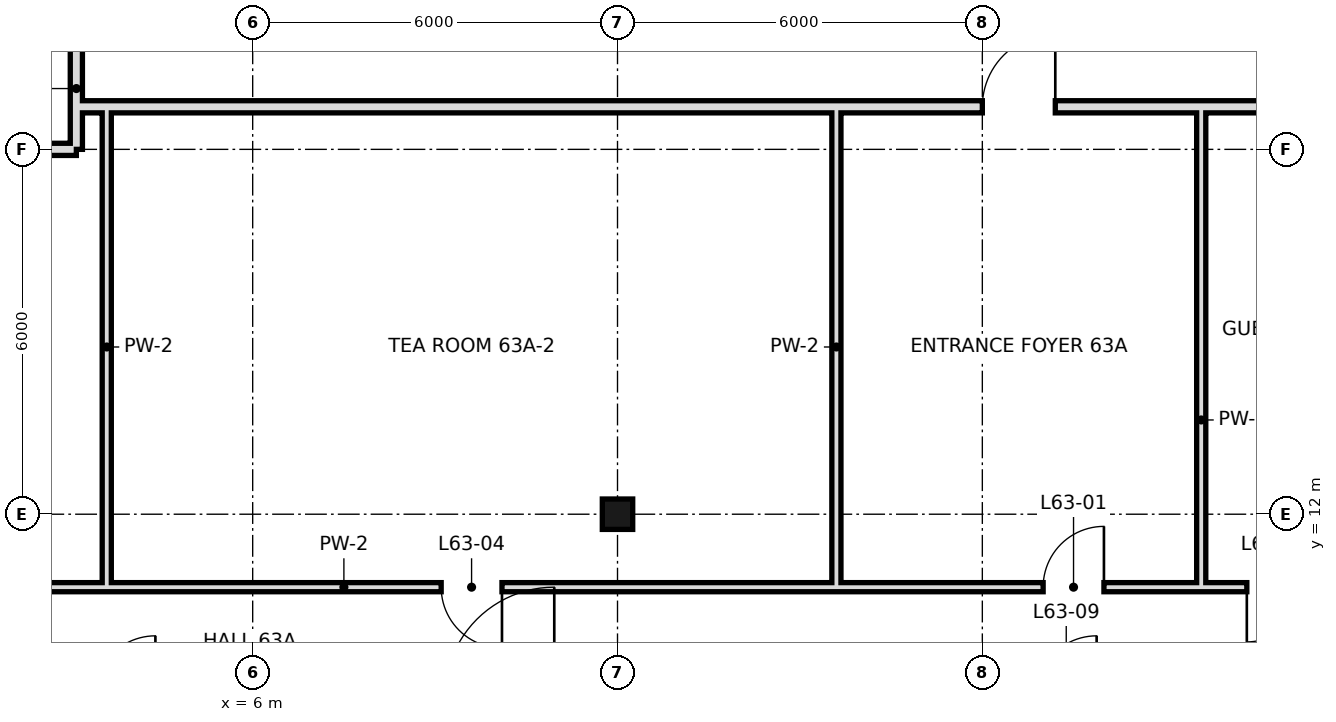
"""IFC4 building model, lengths in metres.
Left out: names, types, materials, properties, quantities, classifications, styles, units other than length and angle.
Written with IfcOpenShell. Run it as: python <this file> out.ifc"""

import sys

from ifc_helpers import new_model, si_unit, direction, frame, frame_2d, origin, origin_2d, place, context, subcontext, project, spatial, rectangle, hollow_rectangle, extrude, element, fill, save


model = new_model("IFC4")
c1 = context("Model", 3, precision=1e-05, world=origin(), true_north=direction((0.0, 1.0)))
c2 = subcontext(c1, "Body", "Model", "MODEL_VIEW")
j1 = project(units=[si_unit("LENGTHUNIT", "METRE"), si_unit("PLANEANGLEUNIT", "RADIAN")], contexts=[c1])
p1 = place(None, origin())
s1 = spatial("IfcSite", under=j1, at=p1, CompositionType="ELEMENT")
p2 = place(p1, origin())
s2 = spatial("IfcBuilding", under=s1, at=p2, CompositionType="ELEMENT")
p3 = place(p2, frame((0.0, 0.0, 266.6)))
s3 = spatial("IfcBuildingStorey", under=s2, at=p3, CompositionType="ELEMENT", Elevation=266.6)
p4 = place(p3, frame((12.0, 12.0, 0.0), z_axis=(0.0, 0.0, 1.0), x_axis=(1.0, 0.0, 0.0)))
e1 = element("IfcColumn", 1, at=p4, inside=s3, PredefinedType="COLUMN", context=c2, shape_type="SweptSolid", body=[
    extrude(hollow_rectangle(XDim=0.5, YDim=0.5, WallThickness=0.025, at=origin_2d()), origin(), (0.0, 0.0, 1.0), 3.6),
])
for number, where, z_axis, x_axis in (
    (2, (15.6, 10.8, 0.0), (0.0, 0.0, 1.0), (0.0, 1.0, 0.0)),
    (3, (21.6, 10.8, 0.0), (0.0, 0.0, 1.0), (0.0, 1.0, 0.0)),
):
    element("IfcWall", number, at=place(p3, frame(where, z_axis=z_axis, x_axis=x_axis)), inside=s3, PredefinedType="PARTITIONING", context=c2, shape_type="SweptSolid", body=[
        extrude(rectangle(XDim=7.9, YDim=0.15, at=frame_2d((3.95, 0.0))), origin(), (0.0, 0.0, 1.0), 3.42),
    ])
p5 = place(p3, frame((3.1, 18.7, 0.0), z_axis=(0.0, 0.0, 1.0), x_axis=(0.0, 1.0, 0.0)))
e4 = element("IfcWall", 4, at=p5, inside=s3, PredefinedType="SOLIDWALL", context=c2, shape_type="SweptSolid", body=[
    extrude(rectangle(XDim=21.5, YDim=0.2, at=frame_2d((10.75, 0.0))), origin(), (0.0, 0.0, 1.0), 2.97),
])
p6 = place(p5, frame((6.5, 0.0, 0.0)))
e5 = element("IfcOpeningElement", 5, at=p6, cuts=e4, PredefinedType="OPENING", context=c2, shape_type="SweptSolid", body=[
    extrude(rectangle(XDim=1.2, YDim=2.4, at=frame_2d((0.6, 1.2))), frame((0.0, 0.11, 0.0), z_axis=(0.0, -1.0, 0.0), x_axis=(1.0, 0.0, 0.0)), (0.0, 0.0, 1.0), 0.22),
])
p7 = place(p3, frame((3.1, 18.0, 0.0), z_axis=(0.0, 0.0, 1.0), x_axis=(0.0, 1.0, 0.0)))
e6 = element("IfcWall", 6, at=p7, inside=s3, PredefinedType="SOLIDWALL", context=c2, shape_type="SweptSolid", body=[
    extrude(rectangle(XDim=0.7, YDim=0.2, at=frame_2d((0.35, 0.0))), origin(), (0.0, 0.0, 1.0), 2.97),
])
p8 = place(p3, frame((3.6, 10.8, 0.0), z_axis=(0.0, 0.0, 1.0), x_axis=(0.0, 1.0, 0.0)))
e7 = element("IfcWall", 7, at=p8, inside=s3, PredefinedType="PARTITIONING", context=c2, shape_type="SweptSolid", body=[
    extrude(rectangle(XDim=7.9, YDim=0.15, at=frame_2d((3.95, 0.0))), origin(), (0.0, 0.0, 1.0), 3.42),
])
p9 = place(p3, frame((-6.6, 10.8, 0.0), z_axis=(0.0, 0.0, 1.0), x_axis=(1.0, 0.0, 0.0)))
e8 = element("IfcWall", 8, at=p9, inside=s3, PredefinedType="PARTITIONING", context=c2, shape_type="SweptSolid", body=[
    extrude(rectangle(XDim=28.2, YDim=0.15, at=frame_2d((14.1, 0.0))), origin(), (0.0, 0.0, 1.0), 3.42),
])
p10 = place(p9, frame((25.6, 0.0, 0.0)))
e9 = element("IfcOpeningElement", 9, at=p10, cuts=e8, PredefinedType="OPENING", context=c2, shape_type="SweptSolid", body=[
    extrude(rectangle(XDim=1.0, YDim=2.4, at=frame_2d((0.5, 1.2))), frame((0.0, 0.085, 0.0), z_axis=(0.0, -1.0, 0.0), x_axis=(1.0, 0.0, 0.0)), (0.0, 0.0, 1.0), 0.17),
])
p11 = place(p9, frame((4.6, 0.0, 0.0)))
e10 = element("IfcOpeningElement", 10, at=p11, cuts=e8, PredefinedType="OPENING", context=c2, shape_type="SweptSolid", body=[
    extrude(rectangle(XDim=1.0, YDim=2.4, at=frame_2d((0.5, 1.2))), frame((0.0, 0.085, 0.0), z_axis=(0.0, -1.0, 0.0), x_axis=(1.0, 0.0, 0.0)), (0.0, 0.0, 1.0), 0.17),
])
p12 = place(p9, frame((15.7, 0.0, 0.0)))
e11 = element("IfcOpeningElement", 11, at=p12, cuts=e8, PredefinedType="OPENING", context=c2, shape_type="SweptSolid", body=[
    extrude(rectangle(XDim=1.0, YDim=2.4, at=frame_2d((0.5, 1.2))), frame((0.0, 0.085, 0.0), z_axis=(0.0, -1.0, 0.0), x_axis=(1.0, 0.0, 0.0)), (0.0, 0.0, 1.0), 0.17),
])
p13 = place(p3, frame((21.6, 10.8, 0.0), z_axis=(0.0, 0.0, 1.0), x_axis=(1.0, 0.0, 0.0)))
e12 = element("IfcWall", 12, at=p13, inside=s3, PredefinedType="PARTITIONING", context=c2, shape_type="SweptSolid", body=[
    extrude(rectangle(XDim=2.4, YDim=0.15, at=frame_2d((1.2, 0.0))), origin(), (0.0, 0.0, 1.0), 3.42),
])
p14 = place(p13, frame((0.75, 0.0, 0.0)))
e13 = element("IfcOpeningElement", 13, at=p14, cuts=e12, PredefinedType="OPENING", context=c2, shape_type="SweptSolid", body=[
    extrude(rectangle(XDim=0.9, YDim=2.4, at=frame_2d((0.45, 1.2))), frame((0.0, 0.085, 0.0), z_axis=(0.0, -1.0, 0.0), x_axis=(1.0, 0.0, 0.0)), (0.0, 0.0, 1.0), 0.17),
])
p15 = place(p3, frame((-6.6, 18.0, 0.0), z_axis=(0.0, 0.0, 1.0), x_axis=(1.0, 0.0, 0.0)))
e14 = element("IfcWall", 14, at=p15, inside=s3, PredefinedType="SOLIDWALL", context=c2, shape_type="SweptSolid", body=[
    extrude(rectangle(XDim=9.7, YDim=0.2, at=frame_2d((4.85, 0.0))), origin(), (0.0, 0.0, 1.0), 2.72),
])
p16 = place(p3, frame((3.1, 18.7, 0.0), z_axis=(0.0, 0.0, 1.0), x_axis=(1.0, 0.0, 0.0)))
e15 = element("IfcWall", 15, at=p16, inside=s3, PredefinedType="SOLIDWALL", context=c2, shape_type="SweptSolid", body=[
    extrude(rectangle(XDim=20.9, YDim=0.2, at=frame_2d((10.45, 0.0))), origin(), (0.0, 0.0, 1.0), 2.72),
])
p17 = place(p16, frame((14.9, 0.0, 0.0)))
e16 = element("IfcOpeningElement", 16, at=p17, cuts=e15, PredefinedType="OPENING", context=c2, shape_type="SweptSolid", body=[
    extrude(rectangle(XDim=1.2, YDim=2.4, at=frame_2d((0.6, 1.2))), frame((0.0, 0.11, 0.0), z_axis=(0.0, -1.0, 0.0), x_axis=(1.0, 0.0, 0.0)), (0.0, 0.0, 1.0), 0.22),
])
p18 = place(p10, frame((1.0, 0.0, 0.0), z_axis=(0.0, 0.0, 1.0), x_axis=(-1.0, 0.0, 0.0)))
e17 = element("IfcDoor", 17, at=p18, inside=s3, OperationType="SINGLE_SWING_LEFT", PredefinedType="DOOR", context=c2, shape_type="SweptSolid", body=[
    extrude(rectangle(XDim=1.0, YDim=2.4, at=frame_2d((0.5, 1.2))), frame((0.0, 0.025, 0.0), z_axis=(0.0, -1.0, 0.0), x_axis=(1.0, 0.0, 0.0)), (0.0, 0.0, 1.0), 0.05),
])
fill(e9, e17)
p19 = place(p12, origin())
e18 = element("IfcDoor", 18, at=p19, inside=s3, OperationType="SINGLE_SWING_RIGHT", PredefinedType="DOOR", context=c2, shape_type="SweptSolid", body=[
    extrude(rectangle(XDim=1.0, YDim=2.4, at=frame_2d((0.5, 1.2))), frame((0.0, 0.025, 0.0), z_axis=(0.0, -1.0, 0.0), x_axis=(1.0, 0.0, 0.0)), (0.0, 0.0, 1.0), 0.05),
])
fill(e11, e18)
p20 = place(p14, frame((0.9, 0.0, 0.0), z_axis=(0.0, 0.0, 1.0), x_axis=(-1.0, 0.0, 0.0)))
e19 = element("IfcDoor", 19, at=p20, inside=s3, OperationType="SINGLE_SWING_RIGHT", PredefinedType="DOOR", context=c2, shape_type="SweptSolid", body=[
    extrude(rectangle(XDim=0.9, YDim=2.4, at=frame_2d((0.45, 1.2))), frame((0.0, 0.025, 0.0), z_axis=(0.0, -1.0, 0.0), x_axis=(1.0, 0.0, 0.0)), (0.0, 0.0, 1.0), 0.05),
])
fill(e13, e19)
p21 = place(p17, frame((1.2, 0.0, 0.0), z_axis=(0.0, 0.0, 1.0), x_axis=(-1.0, 0.0, 0.0)))
e20 = element("IfcDoor", 20, at=p21, inside=s3, OperationType="SINGLE_SWING_LEFT", PredefinedType="DOOR", context=c2, shape_type="SweptSolid", body=[
    extrude(rectangle(XDim=1.2, YDim=2.4, at=frame_2d((0.6, 1.2))), frame((0.0, 0.025, 0.0), z_axis=(0.0, -1.0, 0.0), x_axis=(1.0, 0.0, 0.0)), (0.0, 0.0, 1.0), 0.05),
])
fill(e16, e20)
save(model, sys.argv[1])
